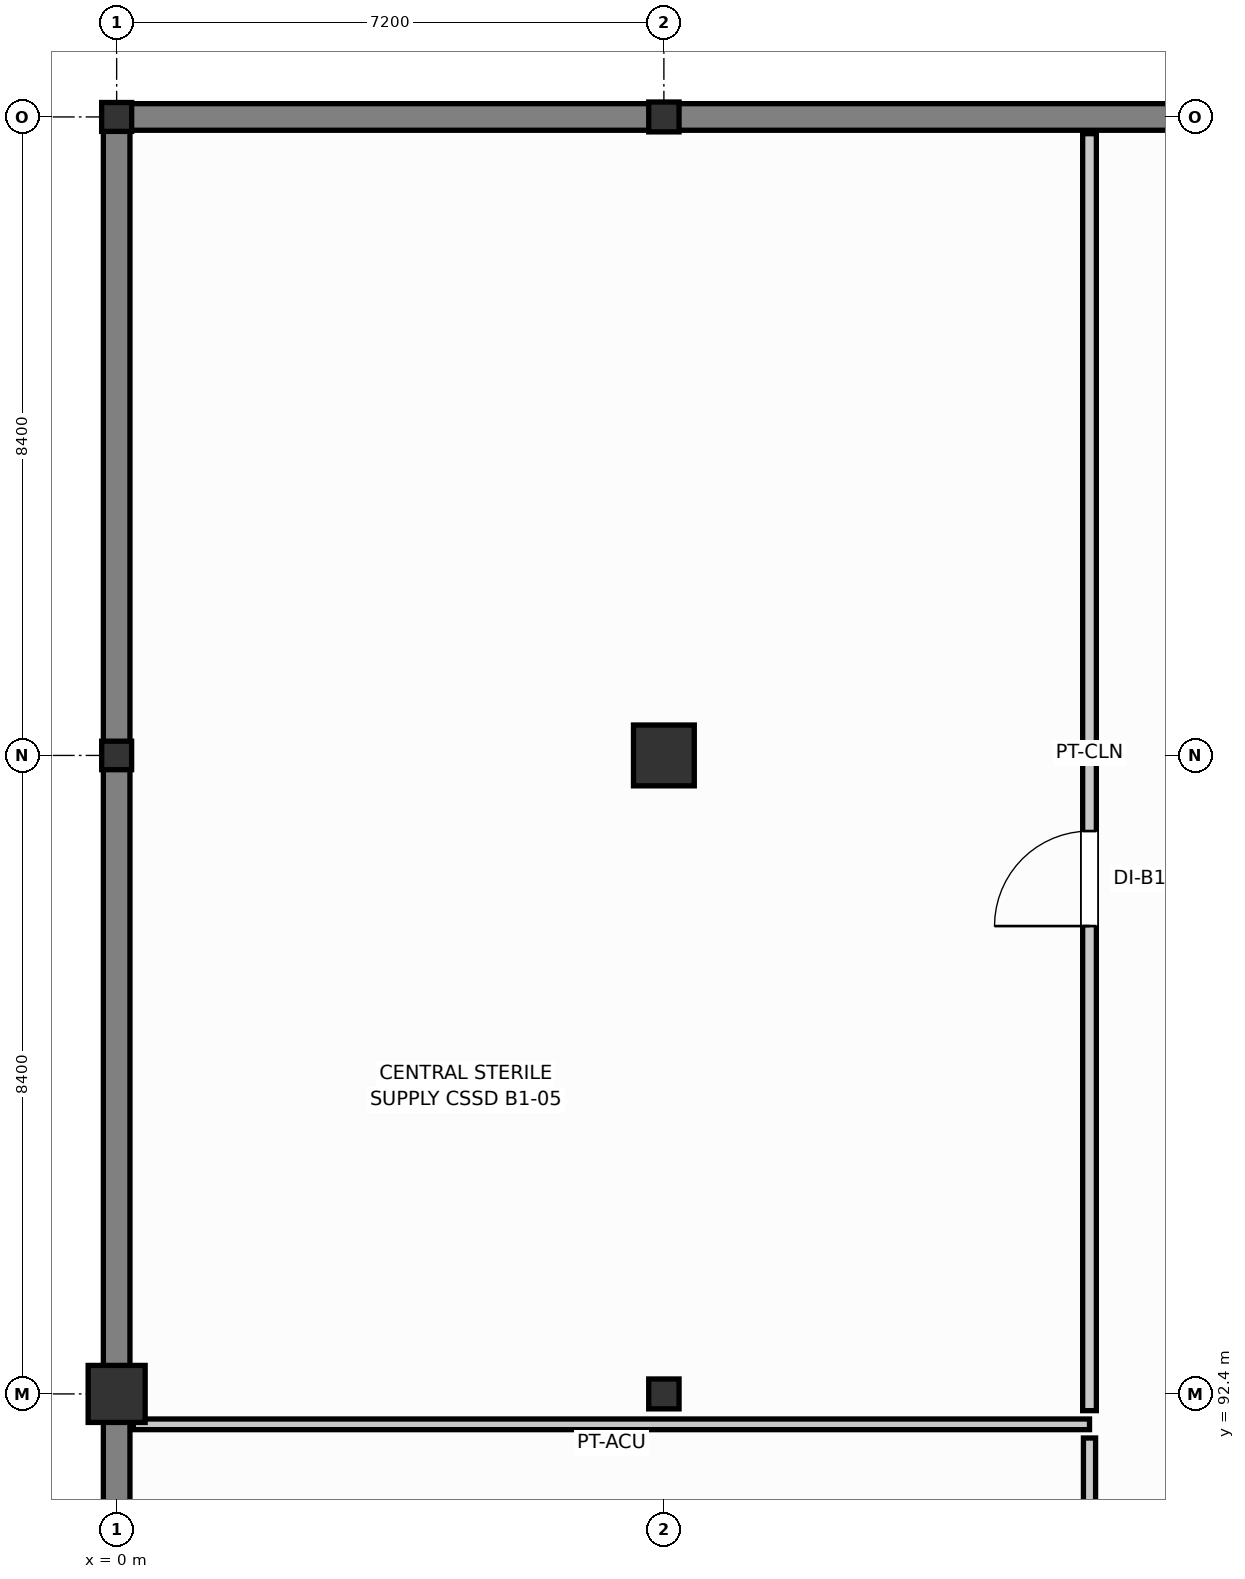
"""IFC4 building model, lengths in metres.
Left out: names, types, materials, properties, quantities, classifications, styles, units other than length and angle.
Written with IfcOpenShell. Run it as: python <this file> out.ifc"""

import sys

from ifc_helpers import new_model, si_unit, direction, frame, frame_2d, origin, origin_2d, place, context, subcontext, project, spatial, rectangle, i_section, extrude, element, fill, save


model = new_model("IFC4")
c1 = context("Model", 3, precision=1e-05, world=origin(), true_north=direction((0.0, 1.0)))
c2 = subcontext(c1, "Body", "Model", "MODEL_VIEW")
j1 = project(units=[si_unit("LENGTHUNIT", "METRE"), si_unit("PLANEANGLEUNIT", "RADIAN")], contexts=[c1])
p1 = place(None, origin())
s1 = spatial("IfcSite", under=j1, at=p1, CompositionType="ELEMENT")
p2 = place(p1, origin())
s2 = spatial("IfcBuilding", under=s1, at=p2, CompositionType="ELEMENT")
p3 = place(p2, frame((0.0, 0.0, -4.2)))
s3 = spatial("IfcBuildingStorey", under=s2, at=p3, CompositionType="ELEMENT", Elevation=-4.2)
p4 = place(p3, frame((0.0, 84.0, 0.0), z_axis=(0.0, 0.0, 1.0), x_axis=(0.0, 1.0, 0.0)))
e1 = element("IfcWall", 1, at=p4, inside=s3, PredefinedType="USERDEFINED", context=c2, shape_type="SweptSolid", body=[
    extrude(rectangle(XDim=8.4, YDim=0.35, at=frame_2d((4.2, 0.0))), origin(), (0.0, 0.0, 1.0), 3.96),
])
p5 = place(p3, frame((0.0, 92.4, 0.0), z_axis=(0.0, 0.0, 1.0), x_axis=(0.0, 1.0, 0.0)))
e2 = element("IfcWall", 2, at=p5, inside=s3, PredefinedType="USERDEFINED", context=c2, shape_type="SweptSolid", body=[
    extrude(rectangle(XDim=8.4, YDim=0.35, at=frame_2d((4.2, 0.0))), origin(), (0.0, 0.0, 1.0), 3.96),
])
p6 = place(p3, frame((0.0, 100.8, 0.0), z_axis=(0.0, 0.0, 1.0), x_axis=(0.0, 1.0, 0.0)))
e3 = element("IfcWall", 3, at=p6, inside=s3, PredefinedType="USERDEFINED", context=c2, shape_type="SweptSolid", body=[
    extrude(rectangle(XDim=8.4, YDim=0.35, at=frame_2d((4.2, 0.0))), origin(), (0.0, 0.0, 1.0), 3.96),
])
for number, where, z_axis, x_axis in (
    (4, (0.0, 109.2, 0.0), (0.0, 0.0, 1.0), (1.0, 0.0, 0.0)),
    (5, (7.2, 109.2, 0.0), (0.0, 0.0, 1.0), (1.0, 0.0, 0.0)),
):
    element("IfcWall", number, at=place(p3, frame(where, z_axis=z_axis, x_axis=x_axis)), inside=s3, PredefinedType="USERDEFINED", context=c2, shape_type="SweptSolid", body=[
        extrude(rectangle(XDim=7.2, YDim=0.35, at=frame_2d((3.6, 0.0))), origin(), (0.0, 0.0, 1.0), 3.96),
    ])
p7 = place(p3, frame((0.0, 92.4, 0.0), z_axis=(0.0, 0.0, 1.0), x_axis=(1.0, 0.0, 0.0)))
e6 = element("IfcColumn", 6, at=p7, inside=s3, PredefinedType="COLUMN", context=c2, shape_type="SweptSolid", body=[
    extrude(rectangle(XDim=0.75, YDim=0.75, at=origin_2d()), origin(), (0.0, 0.0, 1.0), 4.2),
])
p8 = place(p3, frame((0.0, 100.8, 0.0), z_axis=(0.0, 0.0, 1.0), x_axis=(1.0, 0.0, 0.0)))
e7 = element("IfcColumn", 7, at=p8, inside=s3, PredefinedType="COLUMN", context=c2, shape_type="SweptSolid", body=[
    extrude(i_section(OverallWidth=0.394, OverallDepth=0.375, WebThickness=0.017, FlangeThickness=0.028, FilletRadius=0.02, at=origin_2d()), origin(), (0.0, 0.0, 1.0), 4.2),
])
p9 = place(p3, frame((0.0, 109.2, 0.0), z_axis=(0.0, 0.0, 1.0), x_axis=(1.0, 0.0, 0.0)))
e8 = element("IfcColumn", 8, at=p9, inside=s3, PredefinedType="COLUMN", context=c2, shape_type="SweptSolid", body=[
    extrude(i_section(OverallWidth=0.395, OverallDepth=0.38, WebThickness=0.019, FlangeThickness=0.03, FilletRadius=0.02, at=origin_2d()), origin(), (0.0, 0.0, 1.0), 4.2),
])
p10 = place(p3, frame((7.2, 92.4, 0.0), z_axis=(0.0, 0.0, 1.0), x_axis=(1.0, 0.0, 0.0)))
e9 = element("IfcColumn", 9, at=p10, inside=s3, PredefinedType="COLUMN", context=c2, shape_type="SweptSolid", body=[
    extrude(i_section(OverallWidth=0.399, OverallDepth=0.393, WebThickness=0.023, FlangeThickness=0.036, FilletRadius=0.02, at=origin_2d()), origin(), (0.0, 0.0, 1.0), 4.2),
])
p11 = place(p3, frame((7.2, 100.8, 0.0), z_axis=(0.0, 0.0, 1.0), x_axis=(1.0, 0.0, 0.0)))
e10 = element("IfcColumn", 10, at=p11, inside=s3, PredefinedType="COLUMN", context=c2, shape_type="SweptSolid", body=[
    extrude(rectangle(XDim=0.8, YDim=0.8, at=origin_2d()), origin(), (0.0, 0.0, 1.0), 4.2),
])
p12 = place(p3, frame((7.2, 109.2, 0.0), z_axis=(0.0, 0.0, 1.0), x_axis=(1.0, 0.0, 0.0)))
e11 = element("IfcColumn", 11, at=p12, inside=s3, PredefinedType="COLUMN", context=c2, shape_type="SweptSolid", body=[
    extrude(i_section(OverallWidth=0.399, OverallDepth=0.393, WebThickness=0.023, FlangeThickness=0.036, FilletRadius=0.02, at=origin_2d()), origin(), (0.0, 0.0, 1.0), 4.2),
])
p13 = place(p3, frame((0.22, 92.0, 0.0), z_axis=(0.0, 0.0, 1.0), x_axis=(1.0, 0.0, 0.0)))
e12 = element("IfcWall", 12, at=p13, inside=s3, PredefinedType="PARTITIONING", context=c2, shape_type="SweptSolid", body=[
    extrude(rectangle(XDim=12.58, YDim=0.14, at=frame_2d((6.29, 0.0))), origin(), (0.0, 0.0, 1.0), 3.485),
])
p14 = place(p3, frame((12.8, 91.82, 0.0), z_axis=(0.0, 0.0, 1.0), x_axis=(0.0, -1.0, 0.0)))
e13 = element("IfcWall", 13, at=p14, inside=s3, PredefinedType="PARTITIONING", context=c2, shape_type="SweptSolid", body=[
    extrude(rectangle(XDim=15.62, YDim=0.16, at=frame_2d((7.81, 0.0))), origin(), (0.0, 0.0, 1.0), 3.485),
])
p15 = place(p14, frame((5.855, 0.0, 0.0)))
e14 = element("IfcOpeningElement", 14, at=p15, cuts=e13, PredefinedType="OPENING", context=c2, shape_type="SweptSolid", body=[
    extrude(rectangle(XDim=1.25, YDim=2.2, at=frame_2d((0.625, 1.1))), frame((0.0, 0.09, 0.0), z_axis=(0.0, -1.0, 0.0), x_axis=(1.0, 0.0, 0.0)), (0.0, 0.0, 1.0), 0.18),
])
p16 = place(p3, frame((12.8, 108.98, 0.0), z_axis=(0.0, 0.0, 1.0), x_axis=(0.0, -1.0, 0.0)))
e15 = element("IfcWall", 15, at=p16, inside=s3, PredefinedType="PARTITIONING", context=c2, shape_type="SweptSolid", body=[
    extrude(rectangle(XDim=16.8, YDim=0.18, at=frame_2d((8.4, 0.0))), origin(), (0.0, 0.0, 1.0), 3.328),
])
p17 = place(p16, frame((9.175, 0.0, 0.0)))
e16 = element("IfcOpeningElement", 16, at=p17, cuts=e15, PredefinedType="OPENING", context=c2, shape_type="SweptSolid", body=[
    extrude(rectangle(XDim=1.25, YDim=2.2, at=frame_2d((0.625, 1.1))), frame((0.0, 0.1, 0.0), z_axis=(0.0, -1.0, 0.0), x_axis=(1.0, 0.0, 0.0)), (0.0, 0.0, 1.0), 0.2),
])
p18 = place(p17, frame((1.25, 0.0, 0.0), z_axis=(0.0, 0.0, 1.0), x_axis=(-1.0, 0.0, 0.0)))
e17 = element("IfcDoor", 17, at=p18, inside=s3, OperationType="SINGLE_SWING_LEFT", PredefinedType="DOOR", context=c2, shape_type="SweptSolid", body=[
    extrude(rectangle(XDim=1.25, YDim=2.2, at=frame_2d((0.625, 1.1))), frame((0.0, 0.025, 0.0), z_axis=(0.0, -1.0, 0.0), x_axis=(1.0, 0.0, 0.0)), (0.0, 0.0, 1.0), 0.05),
])
fill(e16, e17)
save(model, sys.argv[1])
